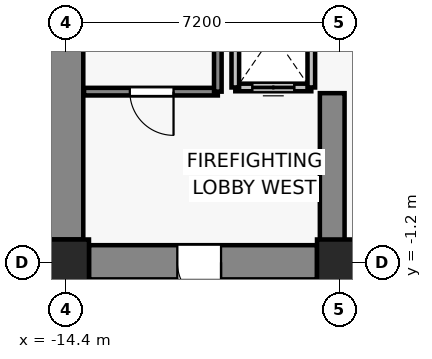
"""IFC4 building model, lengths in metres.
Left out: names, types, materials, properties, quantities, classifications, styles, units other than length and angle.
Written with IfcOpenShell. Run it as: python <this file> out.ifc"""

import sys

from ifc_helpers import new_model, si_unit, direction, frame, frame_2d, origin, origin_2d, place, context, subcontext, project, spatial, rectangle, extrude, source, transform, mapped, element, fill, save


model = new_model("IFC4")
c1 = context("Model", 3, precision=1e-05, world=origin(), true_north=direction((0.0, 1.0)))
c2 = subcontext(c1, "Body", "Model", "MODEL_VIEW")
j1 = project(units=[si_unit("LENGTHUNIT", "METRE"), si_unit("PLANEANGLEUNIT", "RADIAN")], contexts=[c1])
p1 = place(None, origin())
s1 = spatial("IfcSite", under=j1, at=p1, CompositionType="ELEMENT")
p2 = place(p1, origin())
s2 = spatial("IfcBuilding", under=s1, at=p2, CompositionType="ELEMENT")
p3 = place(p2, frame((0.0, 0.0, 9.4)))
s3 = spatial("IfcBuildingStorey", under=s2, at=p3, CompositionType="ELEMENT", Elevation=9.4)
for number, where, z_axis, x_axis in (
    (1, (-14.4, -1.2, 0.0), (0.0, 0.0, 1.0), (1.0, 0.0, 0.0)),
    (2, (-7.2, -1.2, 0.0), (0.0, 0.0, 1.0), (1.0, 0.0, 0.0)),
):
    element("IfcColumn", number, at=place(p3, frame(where, z_axis=z_axis, x_axis=x_axis)), inside=s3, PredefinedType="COLUMN", context=c2, shape_type="SweptSolid", body=[
        extrude(rectangle(XDim=1.2, YDim=1.2, at=origin_2d()), origin(), (0.0, 0.0, 1.0), 4.4),
    ])
p4 = place(p3, frame((-14.4, -0.6, 0.0), z_axis=(0.0, 0.0, 1.0), x_axis=(0.0, 1.0, 0.0)))
e3 = element("IfcWall", 3, at=p4, inside=s3, PredefinedType="SHEAR", context=c2, shape_type="SweptSolid", body=[
    extrude(rectangle(XDim=6.6, YDim=0.9, at=frame_2d((3.3, 0.0))), origin(), (0.0, 0.0, 1.0), 4.1),
])
p5 = place(p3, frame((-7.8, -1.2, 0.0), z_axis=(0.0, 0.0, 1.0), x_axis=(-1.0, 0.0, 0.0)))
e4 = element("IfcWall", 4, at=p5, inside=s3, PredefinedType="SHEAR", context=c2, shape_type="SweptSolid", body=[
    extrude(rectangle(XDim=6.0, YDim=0.9, at=frame_2d((3.0, 0.0))), origin(), (0.0, 0.0, 1.0), 4.1),
])
p6 = place(p5, frame((2.525, 0.0, 0.0)))
e5 = element("IfcOpeningElement", 5, at=p6, cuts=e4, PredefinedType="OPENING", context=c2, shape_type="SweptSolid", body=[
    extrude(rectangle(XDim=1.15, YDim=2.15, at=frame_2d((0.575, 1.075))), frame((0.0, 0.46, 0.0), z_axis=(0.0, -1.0, 0.0), x_axis=(1.0, 0.0, 0.0)), (0.0, 0.0, 1.0), 0.92),
])
p7 = place(p3, frame((-7.4, -0.75, 0.0), z_axis=(0.0, 0.0, 1.0), x_axis=(0.0, 1.0, 0.0)))
e6 = element("IfcWall", 6, at=p7, inside=s3, PredefinedType="SHEAR", context=c2, shape_type="SweptSolid", body=[
    extrude(rectangle(XDim=4.0, YDim=0.65, at=frame_2d((2.0, 0.0))), origin(), (0.0, 0.0, 1.0), 4.1),
])
p8 = place(p3, frame((-7.95, 3.4, 0.0), z_axis=(0.0, 0.0, 1.0), x_axis=(-1.0, 0.0, 0.0)))
e7 = element("IfcWall", 7, at=p8, inside=s3, PredefinedType="SOLIDWALL", context=c2, shape_type="SweptSolid", body=[
    extrude(rectangle(XDim=2.0, YDim=0.2, at=frame_2d((1.0, 0.0))), origin(), (0.0, 0.0, 1.0), 4.1),
])
p9 = place(p8, frame((0.45, 0.0, 0.0)))
e8 = element("IfcOpeningElement", 8, at=p9, cuts=e7, PredefinedType="OPENING", context=c2, shape_type="SweptSolid", body=[
    extrude(rectangle(XDim=1.1, YDim=2.2, at=frame_2d((0.55, 1.1))), frame((0.0, 0.11, 0.0), z_axis=(0.0, -1.0, 0.0), x_axis=(1.0, 0.0, 0.0)), (0.0, 0.0, 1.0), 0.22),
])
for number, where, z_axis, x_axis in (
    (9, (-9.95, 3.4, 0.0), (0.0, 0.0, 1.0), (0.0, 1.0, 0.0)),
    (10, (-7.95, 6.2, 0.0), (0.0, 0.0, 1.0), (0.0, -1.0, 0.0)),
):
    element("IfcWall", number, at=place(p3, frame(where, z_axis=z_axis, x_axis=x_axis)), inside=s3, PredefinedType="SOLIDWALL", context=c2, shape_type="SweptSolid", body=[
        extrude(rectangle(XDim=2.8, YDim=0.2, at=frame_2d((1.4, 0.0))), origin(), (0.0, 0.0, 1.0), 4.1),
    ])
p10 = place(p3, frame((-10.41, 3.29, 0.0), z_axis=(0.0, 0.0, 1.0), x_axis=(-1.0, 0.0, 0.0)))
e11 = element("IfcWall", 11, at=p10, inside=s3, PredefinedType="SOLIDWALL", context=c2, shape_type="SweptSolid", body=[
    extrude(rectangle(XDim=3.52, YDim=0.2, at=frame_2d((1.76, 0.0))), origin(), (0.0, 0.0, 1.0), 4.1),
])
p11 = place(p10, frame((1.165, 0.0, 0.0)))
e12 = element("IfcOpeningElement", 12, at=p11, cuts=e11, PredefinedType="OPENING", context=c2, shape_type="SweptSolid", body=[
    extrude(rectangle(XDim=1.15, YDim=2.15, at=frame_2d((0.575, 1.075))), frame((0.0, 0.11, 0.0), z_axis=(0.0, -1.0, 0.0), x_axis=(1.0, 0.0, 0.0)), (0.0, 0.0, 1.0), 0.22),
])
p12 = place(p3, frame((-10.41, 12.13, 0.0), z_axis=(0.0, 0.0, 1.0), x_axis=(0.0, -1.0, 0.0)))
e13 = element("IfcWall", 13, at=p12, inside=s3, PredefinedType="SOLIDWALL", context=c2, shape_type="SweptSolid", body=[
    extrude(rectangle(XDim=8.84, YDim=0.2, at=frame_2d((4.42, 0.0))), origin(), (0.0, 0.0, 1.0), 4.1),
])
m1 = source(origin(), c2, "Body", "SweptSolid", [
    extrude(rectangle(XDim=1.1, YDim=2.2, at=frame_2d((0.55, 1.1))), frame((0.0, 0.025, 0.0), z_axis=(0.0, -1.0, 0.0), x_axis=(1.0, 0.0, 0.0)), (0.0, 0.0, 1.0), 0.05),
])
p13 = place(p9, origin())
e14 = element("IfcDoor", 14, at=p13, inside=s3, OperationType="DOUBLE_DOOR_SLIDING", PredefinedType="DOOR", context=c2, shape_type="MappedRepresentation", body=[
    mapped(m1, transform((0.0, 0.0, 0.0), x_axis=(1.0, 0.0, 0.0), y_axis=(0.0, 1.0, 0.0), z_axis=(0.0, 0.0, 1.0), scale=1.0)),
])
fill(e8, e14)
m2 = source(origin(), c2, "Body", "SweptSolid", [
    extrude(rectangle(XDim=1.15, YDim=2.15, at=frame_2d((0.575, 1.075))), frame((0.0, 0.025, 0.0), z_axis=(0.0, -1.0, 0.0), x_axis=(1.0, 0.0, 0.0)), (0.0, 0.0, 1.0), 0.05),
])
p14 = place(p11, origin())
e15 = element("IfcDoor", 15, at=p14, inside=s3, OperationType="SINGLE_SWING_LEFT", PredefinedType="DOOR", context=c2, shape_type="MappedRepresentation", body=[
    mapped(m2, transform((0.0, 0.0, 0.0), x_axis=(1.0, 0.0, 0.0), y_axis=(0.0, 1.0, 0.0), z_axis=(0.0, 0.0, 1.0), scale=1.0)),
])
fill(e12, e15)
p15 = place(p6, origin())
e16 = element("IfcDoor", 16, at=p15, inside=s3, OperationType="SINGLE_SWING_LEFT", PredefinedType="DOOR", context=c2, shape_type="MappedRepresentation", body=[
    mapped(m2, transform((0.0, 0.0, 0.0), x_axis=(1.0, 0.0, 0.0), y_axis=(0.0, 1.0, 0.0), z_axis=(0.0, 0.0, 1.0), scale=1.0)),
])
fill(e5, e16)
save(model, sys.argv[1])
